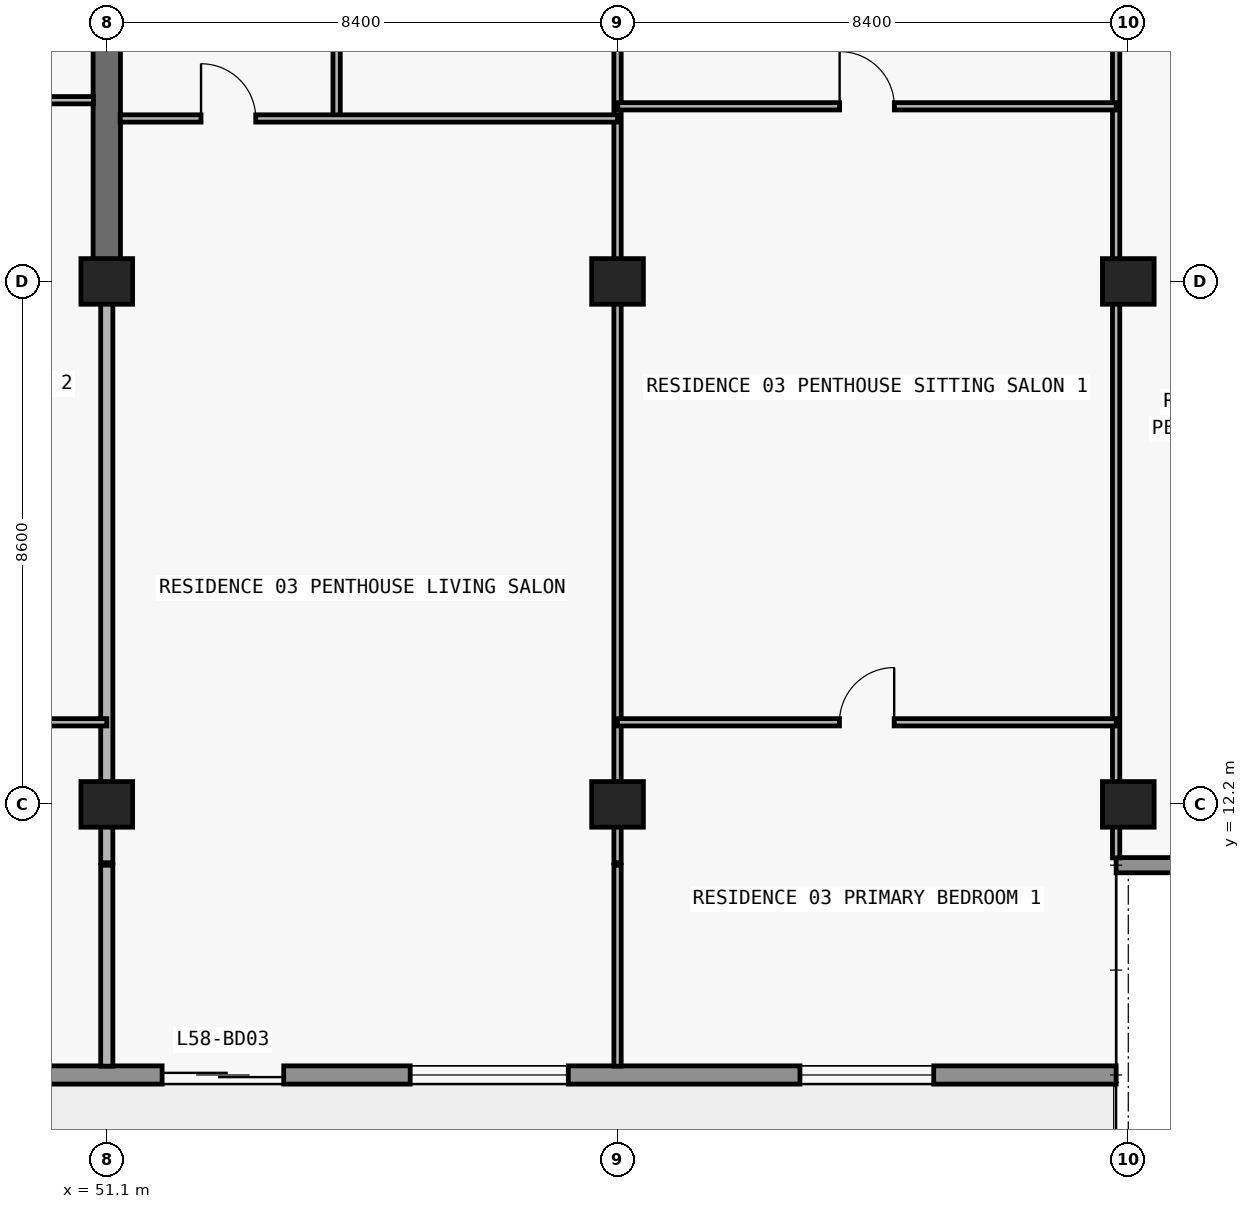
"""IFC4 building model, lengths in metres.
Left out: names, types, materials, properties, quantities, classifications, styles, units other than length and angle.
Written with IfcOpenShell. Run it as: python <this file> out.ifc"""

import sys

from ifc_helpers import new_model, si_unit, direction, frame, frame_2d, origin, origin_2d, place, context, subcontext, project, spatial, rectangle, extrude, element, fill, save


model = new_model("IFC4")
c1 = context("Model", 3, precision=1e-05, world=origin(), true_north=direction((0.0, 1.0)))
c2 = subcontext(c1, "Body", "Model", "MODEL_VIEW")
j1 = project(units=[si_unit("LENGTHUNIT", "METRE"), si_unit("PLANEANGLEUNIT", "RADIAN")], contexts=[c1])
p1 = place(None, origin())
s1 = spatial("IfcSite", under=j1, at=p1, CompositionType="ELEMENT")
p2 = place(p1, origin())
s2 = spatial("IfcBuilding", under=s1, at=p2, CompositionType="ELEMENT")
p3 = place(p2, frame((0.0, 0.0, 208.2)))
s3 = spatial("IfcBuildingStorey", under=s2, at=p3, CompositionType="ELEMENT", Elevation=208.2)
for number, where, z_axis, x_axis in (
    (1, (51.1, 12.2, 0.0), (0.0, 0.0, 1.0), (1.0, 0.0, 0.0)),
    (2, (59.5, 12.2, 0.0), (0.0, 0.0, 1.0), (1.0, 0.0, 0.0)),
    (3, (67.9, 12.2, 0.0), (0.0, 0.0, 1.0), (1.0, 0.0, 0.0)),
    (4, (51.1, 20.8, 0.0), (0.0, 0.0, 1.0), (1.0, 0.0, 0.0)),
    (5, (59.5, 20.8, 0.0), (0.0, 0.0, 1.0), (1.0, 0.0, 0.0)),
    (6, (67.9, 20.8, 0.0), (0.0, 0.0, 1.0), (1.0, 0.0, 0.0)),
):
    element("IfcColumn", number, at=place(p3, frame(where, z_axis=z_axis, x_axis=x_axis)), inside=s3, PredefinedType="COLUMN", context=c2, shape_type="SweptSolid", body=[
        extrude(rectangle(XDim=0.85, YDim=0.75, at=origin_2d()), origin(), (0.0, 0.0, 1.0), 3.05),
    ])
p4 = place(p3, frame((51.1, 20.8, 0.0), z_axis=(0.0, 0.0, 1.0), x_axis=(0.0, 1.0, 0.0)))
e7 = element("IfcWall", 7, at=p4, inside=s3, PredefinedType="SHEAR", context=c2, shape_type="SweptSolid", body=[
    extrude(rectangle(XDim=8.6, YDim=0.45, at=frame_2d((4.3, 0.0))), origin(), (0.0, 0.0, 1.0), 3.05),
])
p5 = place(p3, frame((67.7, 7.75, 0.0), z_axis=(0.0, 0.0, 1.0), x_axis=(-1.0, 0.0, 0.0)))
e8 = element("IfcWall", 8, at=p5, inside=s3, PredefinedType="STANDARD", context=c2, shape_type="SweptSolid", body=[
    extrude(rectangle(XDim=57.6, YDim=0.3, at=frame_2d((28.8, 0.0))), origin(), (0.0, 0.0, 1.0), 3.05),
])
p6 = place(p5, frame((54.69, 0.0, 0.0)))
e9 = element("IfcOpeningElement", 9, at=p6, cuts=e8, PredefinedType="OPENING", context=c2, shape_type="SweptSolid", body=[
    extrude(rectangle(XDim=2.0, YDim=2.3, at=frame_2d((1.0, 1.15))), frame((0.0, 0.16, 0.0), z_axis=(0.0, -1.0, 0.0), x_axis=(1.0, 0.0, 0.0)), (0.0, 0.0, 1.0), 0.32),
])
p7 = place(p5, frame((50.21, 0.0, 0.65)))
e10 = element("IfcOpeningElement", 10, at=p7, cuts=e8, PredefinedType="OPENING", context=c2, shape_type="SweptSolid", body=[
    extrude(rectangle(XDim=2.6, YDim=1.85, at=frame_2d((1.3, 0.925))), frame((0.0, 0.16, 0.0), z_axis=(0.0, -1.0, 0.0), x_axis=(1.0, 0.0, 0.0)), (0.0, 0.0, 1.0), 0.32),
])
p8 = place(p5, frame((44.1, 0.0, 0.85)))
e11 = element("IfcOpeningElement", 11, at=p8, cuts=e8, PredefinedType="OPENING", context=c2, shape_type="SweptSolid", body=[
    extrude(rectangle(XDim=2.2, YDim=1.55, at=frame_2d((1.1, 0.775))), frame((0.0, 0.16, 0.0), z_axis=(0.0, -1.0, 0.0), x_axis=(1.0, 0.0, 0.0)), (0.0, 0.0, 1.0), 0.32),
])
p9 = place(p5, frame((38.09, 0.0, 0.0)))
e12 = element("IfcOpeningElement", 12, at=p9, cuts=e8, PredefinedType="OPENING", context=c2, shape_type="SweptSolid", body=[
    extrude(rectangle(XDim=2.0, YDim=2.3, at=frame_2d((1.0, 1.15))), frame((0.0, 0.16, 0.0), z_axis=(0.0, -1.0, 0.0), x_axis=(1.0, 0.0, 0.0)), (0.0, 0.0, 1.0), 0.32),
])
p10 = place(p5, frame((33.41, 0.0, 0.65)))
e13 = element("IfcOpeningElement", 13, at=p10, cuts=e8, PredefinedType="OPENING", context=c2, shape_type="SweptSolid", body=[
    extrude(rectangle(XDim=2.6, YDim=1.85, at=frame_2d((1.3, 0.925))), frame((0.0, 0.16, 0.0), z_axis=(0.0, -1.0, 0.0), x_axis=(1.0, 0.0, 0.0)), (0.0, 0.0, 1.0), 0.32),
])
p11 = place(p5, frame((27.7, 0.0, 0.85)))
e14 = element("IfcOpeningElement", 14, at=p11, cuts=e8, PredefinedType="OPENING", context=c2, shape_type="SweptSolid", body=[
    extrude(rectangle(XDim=2.2, YDim=1.55, at=frame_2d((1.1, 0.775))), frame((0.0, 0.16, 0.0), z_axis=(0.0, -1.0, 0.0), x_axis=(1.0, 0.0, 0.0)), (0.0, 0.0, 1.0), 0.32),
])
p12 = place(p5, frame((19.7, 0.0, 0.85)))
e15 = element("IfcOpeningElement", 15, at=p12, cuts=e8, PredefinedType="OPENING", context=c2, shape_type="SweptSolid", body=[
    extrude(rectangle(XDim=2.2, YDim=1.55, at=frame_2d((1.1, 0.775))), frame((0.0, 0.16, 0.0), z_axis=(0.0, -1.0, 0.0), x_axis=(1.0, 0.0, 0.0)), (0.0, 0.0, 1.0), 0.32),
])
p13 = place(p5, frame((13.69, 0.0, 0.0)))
e16 = element("IfcOpeningElement", 16, at=p13, cuts=e8, PredefinedType="OPENING", context=c2, shape_type="SweptSolid", body=[
    extrude(rectangle(XDim=2.0, YDim=2.3, at=frame_2d((1.0, 1.15))), frame((0.0, 0.16, 0.0), z_axis=(0.0, -1.0, 0.0), x_axis=(1.0, 0.0, 0.0)), (0.0, 0.0, 1.0), 0.32),
])
p14 = place(p5, frame((9.01, 0.0, 0.65)))
e17 = element("IfcOpeningElement", 17, at=p14, cuts=e8, PredefinedType="OPENING", context=c2, shape_type="SweptSolid", body=[
    extrude(rectangle(XDim=2.6, YDim=1.85, at=frame_2d((1.3, 0.925))), frame((0.0, 0.16, 0.0), z_axis=(0.0, -1.0, 0.0), x_axis=(1.0, 0.0, 0.0)), (0.0, 0.0, 1.0), 0.32),
])
p15 = place(p5, frame((3.0, 0.0, 0.85)))
e18 = element("IfcOpeningElement", 18, at=p15, cuts=e8, PredefinedType="OPENING", context=c2, shape_type="SweptSolid", body=[
    extrude(rectangle(XDim=2.2, YDim=1.55, at=frame_2d((1.1, 0.775))), frame((0.0, 0.16, 0.0), z_axis=(0.0, -1.0, 0.0), x_axis=(1.0, 0.0, 0.0)), (0.0, 0.0, 1.0), 0.32),
])
p16 = place(p3, frame((67.7, 11.2, 0.0), z_axis=(0.0, 0.0, 1.0), x_axis=(1.0, 0.0, 0.0)))
e19 = element("IfcWall", 19, at=p16, inside=s3, PredefinedType="ELEMENTEDWALL", context=c2, shape_type="SweptSolid", body=[
    extrude(rectangle(XDim=3.85, YDim=0.25, at=frame_2d((1.925, 0.0))), origin(), (0.0, 0.0, 1.0), 3.05),
])
p17 = place(p3, frame((51.1, 7.895, 0.0), z_axis=(0.0, 0.0, 1.0), x_axis=(0.0, 1.0, 0.0)))
e20 = element("IfcWall", 20, at=p17, inside=s3, PredefinedType="PARTITIONING", context=c2, shape_type="SweptSolid", body=[
    extrude(rectangle(XDim=3.305, YDim=0.2, at=frame_2d((1.652, 0.0))), origin(), (0.0, 0.0, 1.0), 3.05),
])
p18 = place(p3, frame((51.1, 11.24, 0.0), z_axis=(0.0, 0.0, 1.0), x_axis=(0.0, 1.0, 0.0)))
e21 = element("IfcWall", 21, at=p18, inside=s3, PredefinedType="PARTITIONING", context=c2, shape_type="SweptSolid", body=[
    extrude(rectangle(XDim=9.555, YDim=0.2, at=frame_2d((4.777, 0.0))), origin(), (0.0, 0.0, 1.0), 2.263),
])
p19 = place(p3, frame((54.88, 23.48, 0.0), z_axis=(0.0, 0.0, 1.0), x_axis=(0.0, 1.0, 0.0)))
e22 = element("IfcWall", 22, at=p19, inside=s3, PredefinedType="PARTITIONING", context=c2, shape_type="SweptSolid", body=[
    extrude(rectangle(XDim=4.8, YDim=0.12, at=frame_2d((2.4, 0.0))), origin(), (0.0, 0.0, 1.0), 3.05),
])
p20 = place(p19, frame((1.95, 0.0, 0.0)))
e23 = element("IfcOpeningElement", 23, at=p20, cuts=e22, PredefinedType="OPENING", context=c2, shape_type="SweptSolid", body=[
    extrude(rectangle(XDim=0.9, YDim=2.15, at=frame_2d((0.45, 1.075))), frame((0.0, 0.07, 0.0), z_axis=(0.0, -1.0, 0.0), x_axis=(1.0, 0.0, 0.0)), (0.0, 0.0, 1.0), 0.14),
])
p21 = place(p3, frame((59.5, 7.895, 0.0), z_axis=(0.0, 0.0, 1.0), x_axis=(0.0, 1.0, 0.0)))
e24 = element("IfcWall", 24, at=p21, inside=s3, PredefinedType="PARTITIONING", context=c2, shape_type="SweptSolid", body=[
    extrude(rectangle(XDim=3.305, YDim=0.12, at=frame_2d((1.652, 0.0))), origin(), (0.0, 0.0, 1.0), 3.05),
])
p22 = place(p3, frame((59.5, 11.24, 0.0), z_axis=(0.0, 0.0, 1.0), x_axis=(0.0, 1.0, 0.0)))
e25 = element("IfcWall", 25, at=p22, inside=s3, PredefinedType="PARTITIONING", context=c2, shape_type="SweptSolid", body=[
    extrude(rectangle(XDim=22.76, YDim=0.12, at=frame_2d((11.38, 0.0))), origin(), (0.0, 0.0, 1.0), 2.263),
])
p23 = place(p22, frame((14.19, 0.0, 0.0)))
e26 = element("IfcOpeningElement", 26, at=p23, cuts=e25, PredefinedType="OPENING", context=c2, shape_type="SweptSolid", body=[
    extrude(rectangle(XDim=0.9, YDim=2.15, at=frame_2d((0.45, 1.075))), frame((0.0, 0.07, 0.0), z_axis=(0.0, -1.0, 0.0), x_axis=(1.0, 0.0, 0.0)), (0.0, 0.0, 1.0), 0.14),
])
p24 = place(p3, frame((67.7, 11.32, 0.0), z_axis=(0.0, 0.0, 1.0), x_axis=(0.0, 1.0, 0.0)))
e27 = element("IfcWall", 27, at=p24, inside=s3, PredefinedType="PARTITIONING", context=c2, shape_type="SweptSolid", body=[
    extrude(rectangle(XDim=22.68, YDim=0.12, at=frame_2d((11.34, 0.0))), origin(), (0.0, 0.0, 1.0), 2.263),
])
p25 = place(p24, frame((14.11, 0.0, 0.0)))
e28 = element("IfcOpeningElement", 28, at=p25, cuts=e27, PredefinedType="OPENING", context=c2, shape_type="SweptSolid", body=[
    extrude(rectangle(XDim=0.9, YDim=2.15, at=frame_2d((0.45, 1.075))), frame((0.0, 0.07, 0.0), z_axis=(0.0, -1.0, 0.0), x_axis=(1.0, 0.0, 0.0)), (0.0, 0.0, 1.0), 0.14),
])
p26 = place(p3, frame((35.1, 13.55, 0.0), z_axis=(0.0, 0.0, 1.0), x_axis=(1.0, 0.0, 0.0)))
e29 = element("IfcWall", 29, at=p26, inside=s3, PredefinedType="PARTITIONING", context=c2, shape_type="SweptSolid", body=[
    extrude(rectangle(XDim=16.0, YDim=0.12, at=frame_2d((8.0, 0.0))), origin(), (0.0, 0.0, 1.0), 3.05),
])
p27 = place(p26, frame((3.35, 0.0, 0.0)))
e30 = element("IfcOpeningElement", 30, at=p27, cuts=e29, PredefinedType="OPENING", context=c2, shape_type="SweptSolid", body=[
    extrude(rectangle(XDim=0.9, YDim=2.15, at=frame_2d((0.45, 1.075))), frame((0.0, 0.07, 0.0), z_axis=(0.0, -1.0, 0.0), x_axis=(1.0, 0.0, 0.0)), (0.0, 0.0, 1.0), 0.14),
])
p28 = place(p26, frame((11.35, 0.0, 0.0)))
e31 = element("IfcOpeningElement", 31, at=p28, cuts=e29, PredefinedType="OPENING", context=c2, shape_type="SweptSolid", body=[
    extrude(rectangle(XDim=0.9, YDim=2.15, at=frame_2d((0.45, 1.075))), frame((0.0, 0.07, 0.0), z_axis=(0.0, -1.0, 0.0), x_axis=(1.0, 0.0, 0.0)), (0.0, 0.0, 1.0), 0.14),
])
p29 = place(p3, frame((59.5, 13.55, 0.0), z_axis=(0.0, 0.0, 1.0), x_axis=(1.0, 0.0, 0.0)))
e32 = element("IfcWall", 32, at=p29, inside=s3, PredefinedType="PARTITIONING", context=c2, shape_type="SweptSolid", body=[
    extrude(rectangle(XDim=8.2, YDim=0.12, at=frame_2d((4.1, 0.0))), origin(), (0.0, 0.0, 1.0), 3.05),
])
p30 = place(p29, frame((3.65, 0.0, 0.0)))
e33 = element("IfcOpeningElement", 33, at=p30, cuts=e32, PredefinedType="OPENING", context=c2, shape_type="SweptSolid", body=[
    extrude(rectangle(XDim=0.9, YDim=2.15, at=frame_2d((0.45, 1.075))), frame((0.0, 0.07, 0.0), z_axis=(0.0, -1.0, 0.0), x_axis=(1.0, 0.0, 0.0)), (0.0, 0.0, 1.0), 0.14),
])
p31 = place(p3, frame((51.32, 23.48, 0.0), z_axis=(0.0, 0.0, 1.0), x_axis=(1.0, 0.0, 0.0)))
e34 = element("IfcWall", 34, at=p31, inside=s3, PredefinedType="PARTITIONING", context=c2, shape_type="SweptSolid", body=[
    extrude(rectangle(XDim=8.18, YDim=0.12, at=frame_2d((4.09, 0.0))), origin(), (0.0, 0.0, 1.0), 3.05),
])
p32 = place(p31, frame((1.33, 0.0, 0.0)))
e35 = element("IfcOpeningElement", 35, at=p32, cuts=e34, PredefinedType="OPENING", context=c2, shape_type="SweptSolid", body=[
    extrude(rectangle(XDim=0.9, YDim=2.15, at=frame_2d((0.45, 1.075))), frame((0.0, 0.07, 0.0), z_axis=(0.0, -1.0, 0.0), x_axis=(1.0, 0.0, 0.0)), (0.0, 0.0, 1.0), 0.14),
])
p33 = place(p3, frame((59.505, 23.68, 0.0), z_axis=(0.0, 0.0, 1.0), x_axis=(1.0, 0.0, 0.0)))
e36 = element("IfcWall", 36, at=p33, inside=s3, PredefinedType="PARTITIONING", context=c2, shape_type="SweptSolid", body=[
    extrude(rectangle(XDim=8.195, YDim=0.12, at=frame_2d((4.098, 0.0))), origin(), (0.0, 0.0, 1.0), 3.05),
])
p34 = place(p33, frame((3.647, 0.0, 0.0)))
e37 = element("IfcOpeningElement", 37, at=p34, cuts=e36, PredefinedType="OPENING", context=c2, shape_type="SweptSolid", body=[
    extrude(rectangle(XDim=0.9, YDim=2.15, at=frame_2d((0.45, 1.075))), frame((0.0, 0.07, 0.0), z_axis=(0.0, -1.0, 0.0), x_axis=(1.0, 0.0, 0.0)), (0.0, 0.0, 1.0), 0.14),
])
p35 = place(p3, frame((42.7, 23.78, 0.0), z_axis=(0.0, 0.0, 1.0), x_axis=(1.0, 0.0, 0.0)))
e38 = element("IfcWall", 38, at=p35, inside=s3, PredefinedType="PARTITIONING", context=c2, shape_type="SweptSolid", body=[
    extrude(rectangle(XDim=8.18, YDim=0.12, at=frame_2d((4.09, 0.0))), origin(), (0.0, 0.0, 1.0), 3.05),
])
p36 = place(p35, frame((3.64, 0.0, 0.0)))
e39 = element("IfcOpeningElement", 39, at=p36, cuts=e38, PredefinedType="OPENING", context=c2, shape_type="SweptSolid", body=[
    extrude(rectangle(XDim=0.9, YDim=2.15, at=frame_2d((0.45, 1.075))), frame((0.0, 0.07, 0.0), z_axis=(0.0, -1.0, 0.0), x_axis=(1.0, 0.0, 0.0)), (0.0, 0.0, 1.0), 0.14),
])
p37 = place(p13, origin())
e40 = element("IfcDoor", 40, at=p37, inside=s3, OperationType="DOUBLE_DOOR_SLIDING", PredefinedType="DOOR", context=c2, shape_type="SweptSolid", body=[
    extrude(rectangle(XDim=2.0, YDim=2.3, at=frame_2d((1.0, 1.15))), frame((0.0, 0.025, 0.0), z_axis=(0.0, -1.0, 0.0), x_axis=(1.0, 0.0, 0.0)), (0.0, 0.0, 1.0), 0.05),
])
fill(e16, e40)
p38 = place(p14, origin())
e41 = element("IfcWindow", 41, at=p38, inside=s3, PartitioningType="SINGLE_PANEL", PredefinedType="WINDOW", context=c2, shape_type="SweptSolid", body=[
    extrude(rectangle(XDim=2.6, YDim=1.85, at=frame_2d((1.3, 0.925))), frame((0.0, 0.03, 0.0), z_axis=(0.0, -1.0, 0.0), x_axis=(1.0, 0.0, 0.0)), (0.0, 0.0, 1.0), 0.06),
])
fill(e17, e41)
p39 = place(p15, origin())
e42 = element("IfcWindow", 42, at=p39, inside=s3, PartitioningType="SINGLE_PANEL", PredefinedType="WINDOW", context=c2, shape_type="SweptSolid", body=[
    extrude(rectangle(XDim=2.2, YDim=1.55, at=frame_2d((1.1, 0.775))), frame((0.0, 0.03, 0.0), z_axis=(0.0, -1.0, 0.0), x_axis=(1.0, 0.0, 0.0)), (0.0, 0.0, 1.0), 0.06),
])
fill(e18, e42)
p40 = place(p32, origin())
e43 = element("IfcDoor", 43, at=p40, inside=s3, OperationType="SINGLE_SWING_LEFT", PredefinedType="DOOR", context=c2, shape_type="SweptSolid", body=[
    extrude(rectangle(XDim=0.9, YDim=2.15, at=frame_2d((0.45, 1.075))), frame((0.0, 0.025, 0.0), z_axis=(0.0, -1.0, 0.0), x_axis=(1.0, 0.0, 0.0)), (0.0, 0.0, 1.0), 0.05),
])
fill(e35, e43)
p41 = place(p34, origin())
e44 = element("IfcDoor", 44, at=p41, inside=s3, OperationType="SINGLE_SWING_LEFT", PredefinedType="DOOR", context=c2, shape_type="SweptSolid", body=[
    extrude(rectangle(XDim=0.9, YDim=2.15, at=frame_2d((0.45, 1.075))), frame((0.0, 0.025, 0.0), z_axis=(0.0, -1.0, 0.0), x_axis=(1.0, 0.0, 0.0)), (0.0, 0.0, 1.0), 0.05),
])
fill(e37, e44)
p42 = place(p30, origin())
e45 = element("IfcDoor", 45, at=p42, inside=s3, OperationType="SINGLE_SWING_RIGHT", PredefinedType="DOOR", context=c2, shape_type="SweptSolid", body=[
    extrude(rectangle(XDim=0.9, YDim=2.15, at=frame_2d((0.45, 1.075))), frame((0.0, 0.025, 0.0), z_axis=(0.0, -1.0, 0.0), x_axis=(1.0, 0.0, 0.0)), (0.0, 0.0, 1.0), 0.05),
])
fill(e33, e45)
save(model, sys.argv[1])
